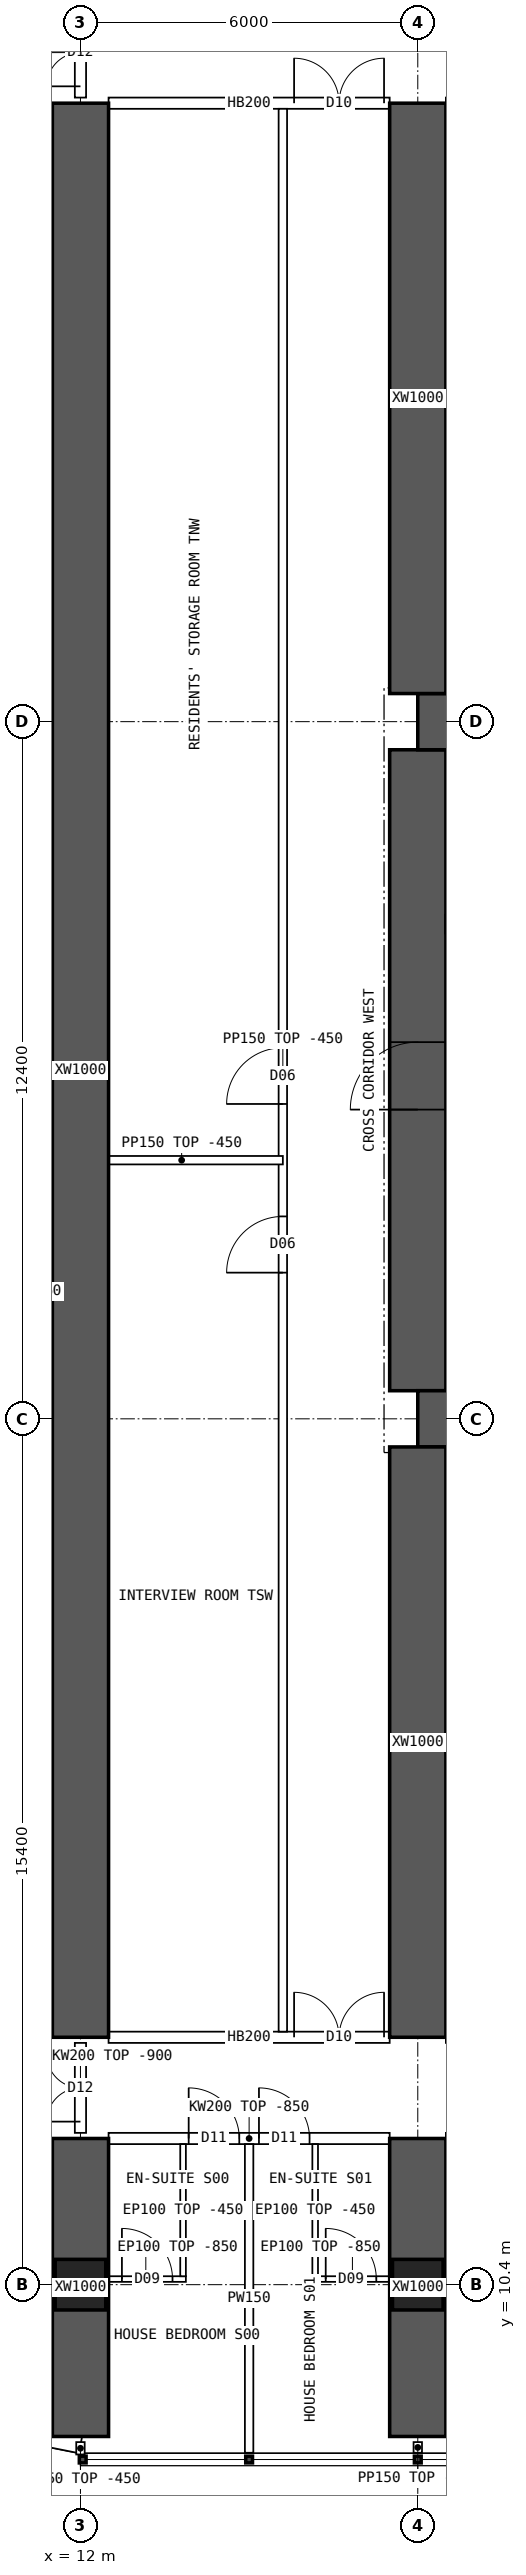
"""IFC4 building model, lengths in metres.
Left out: names, types, materials, properties, quantities, classifications, styles, units other than length and angle.
Written with IfcOpenShell. Run it as: python <this file> out.ifc"""

import sys

from ifc_helpers import new_model, si_unit, direction, frame, frame_2d, origin, origin_2d, place, context, subcontext, project, spatial, polyline, rectangle, hollow_rectangle, outline, extrude, element, fill, save


model = new_model("IFC4")
c1 = context("Model", 3, precision=1e-05, world=origin(), true_north=direction((0.0, 1.0)))
c2 = subcontext(c1, "Body", "Model", "MODEL_VIEW")
j1 = project(units=[si_unit("LENGTHUNIT", "METRE"), si_unit("PLANEANGLEUNIT", "RADIAN")], contexts=[c1])
p1 = place(None, origin())
s1 = spatial("IfcSite", under=j1, at=p1, CompositionType="ELEMENT")
p2 = place(p1, origin())
s2 = spatial("IfcBuilding", under=s1, at=p2, CompositionType="ELEMENT")
p3 = place(p2, frame((0.0, 0.0, 20.2)))
s3 = spatial("IfcBuildingStorey", under=s2, at=p3, CompositionType="ELEMENT", Elevation=20.2)
for number, where, z_axis, x_axis in (
    (1, (12.0, 10.4, 0.0), (0.0, 0.0, 1.0), (1.0, 0.0, 0.0)),
    (2, (18.0, 10.4, 0.0), (0.0, 0.0, 1.0), (1.0, 0.0, 0.0)),
):
    element("IfcColumn", number, at=place(p3, frame(where, z_axis=z_axis, x_axis=x_axis)), inside=s3, PredefinedType="COLUMN", context=c2, shape_type="SweptSolid", body=[
        extrude(hollow_rectangle(XDim=0.9, YDim=0.9, WallThickness=0.09, at=origin_2d()), origin(), (0.0, 0.0, 1.0), 3.75),
    ])
for number, where, z_axis, x_axis in (
    (3, (18.0, 25.8, 0.0), (0.0, 0.0, 1.0), (1.0, 0.0, 0.0)),
    (4, (18.0, 38.2, 0.0), (0.0, 0.0, 1.0), (1.0, 0.0, 0.0)),
):
    element("IfcWall", number, at=place(p3, frame(where, z_axis=z_axis, x_axis=x_axis)), inside=s3, PredefinedType="SHEAR", context=c2, shape_type="SweptSolid", body=[
        extrude(rectangle(XDim=48.0, YDim=1.0, at=frame_2d((24.0, 0.0))), origin(), (0.0, 0.0, 1.0), 3.75),
    ])
p4 = place(p3, frame((18.0, 26.3, 0.0), z_axis=(0.0, 0.0, 1.0), x_axis=(0.0, 1.0, 0.0)))
e5 = element("IfcWall", 5, at=p4, inside=s3, PredefinedType="SHEAR", context=c2, shape_type="SweptSolid", body=[
    extrude(rectangle(XDim=11.4, YDim=1.0, at=frame_2d((5.7, 0.0))), origin(), (0.0, 0.0, 1.0), 3.75),
])
p5 = place(p4, frame((5.0, 0.0, 0.0)))
e6 = element("IfcOpeningElement", 6, at=p5, cuts=e5, PredefinedType="OPENING", context=c2, shape_type="SweptSolid", body=[
    extrude(rectangle(XDim=1.2, YDim=2.1, at=frame_2d((0.6, 1.05))), frame((0.0, 0.51, 0.0), z_axis=(0.0, -1.0, 0.0), x_axis=(1.0, 0.0, 0.0)), (0.0, 0.0, 1.0), 1.02),
])
p6 = place(p3, frame((12.0, 7.7, 0.0), z_axis=(0.0, 0.0, 1.0), x_axis=(0.0, 1.0, 0.0)))
e7 = element("IfcWall", 7, at=p6, inside=s3, PredefinedType="SHEAR", context=c2, shape_type="SweptSolid", body=[
    extrude(rectangle(XDim=5.3, YDim=1.0, at=frame_2d((2.65, 0.0))), origin(), (0.0, 0.0, 1.0), 3.75),
])
p7 = place(p3, frame((12.0, 14.8, 0.0), z_axis=(0.0, 0.0, 1.0), x_axis=(0.0, 1.0, 0.0)))
e8 = element("IfcWall", 8, at=p7, inside=s3, PredefinedType="SHEAR", context=c2, shape_type="SweptSolid", body=[
    extrude(rectangle(XDim=34.4, YDim=1.0, at=frame_2d((17.2, 0.0))), origin(), (0.0, 0.0, 1.0), 3.75),
])
p8 = place(p3, frame((18.0, 7.7, 0.0), z_axis=(0.0, 0.0, 1.0), x_axis=(0.0, 1.0, 0.0)))
e9 = element("IfcWall", 9, at=p8, inside=s3, PredefinedType="SHEAR", context=c2, shape_type="SweptSolid", body=[
    extrude(rectangle(XDim=5.3, YDim=1.0, at=frame_2d((2.65, 0.0))), origin(), (0.0, 0.0, 1.0), 3.75),
])
for number, where, z_axis, x_axis in (
    (10, (18.0, 14.8, 0.0), (0.0, 0.0, 1.0), (0.0, 1.0, 0.0)),
    (11, (18.0, 38.7, 0.0), (0.0, 0.0, 1.0), (0.0, 1.0, 0.0)),
):
    element("IfcWall", number, at=place(p3, frame(where, z_axis=z_axis, x_axis=x_axis)), inside=s3, PredefinedType="SHEAR", context=c2, shape_type="SweptSolid", body=[
        extrude(rectangle(XDim=10.5, YDim=1.0, at=frame_2d((5.25, 0.0))), origin(), (0.0, 0.0, 1.0), 3.75),
    ])
p9 = place(p3, frame((8.843, 8.178, 0.0), z_axis=(0.0, 0.0, 1.0), x_axis=(0.980787251524, -0.195080412259, 0.0)))
e12 = element("IfcWall", 12, at=p9, inside=s3, PredefinedType="SOLIDWALL", context=c2, shape_type="SweptSolid", body=[
    extrude(outline(polyline([(-0.03, -0.15), (3.249, -0.15), (3.189, 0.15), (0.03, 0.15), (-0.03, -0.15)])), origin(), (0.0, 0.0, 1.0), 3.3),
])
p10 = place(p9, frame((0.909, 0.0, 0.9)))
e13 = element("IfcOpeningElement", 13, at=p10, cuts=e12, PredefinedType="OPENING", context=c2, shape_type="SweptSolid", body=[
    extrude(rectangle(XDim=1.4, YDim=1.8, at=frame_2d((0.7, 0.9))), frame((0.0, 0.16, 0.0), z_axis=(0.0, -1.0, 0.0), x_axis=(1.0, 0.0, 0.0)), (0.0, 0.0, 1.0), 0.32),
])
p11 = place(p3, frame((12.5, 13.0, 0.0), z_axis=(0.0, 0.0, 1.0), x_axis=(1.0, 0.0, 0.0)))
e14 = element("IfcWall", 14, at=p11, inside=s3, PredefinedType="SOLIDWALL", context=c2, shape_type="SweptSolid", body=[
    extrude(outline(polyline([(0.0, 0.0), (5.0, 0.0), (5.0, 2.9), (0.0, 2.9), (0.0, 0.0)])), frame((0.0, 0.1, 0.0), z_axis=(0.0, -1.0, 0.0), x_axis=(1.0, 0.0, 0.0)), (0.0, 0.0, 1.0), 0.2),
])
p12 = place(p11, frame((1.425, 0.0, 0.0)))
e15 = element("IfcOpeningElement", 15, at=p12, cuts=e14, PredefinedType="OPENING", context=c2, shape_type="SweptSolid", body=[
    extrude(rectangle(XDim=0.9, YDim=2.1, at=frame_2d((0.45, 1.05))), frame((0.0, 0.11, 0.0), z_axis=(0.0, -1.0, 0.0), x_axis=(1.0, 0.0, 0.0)), (0.0, 0.0, 1.0), 0.22),
])
p13 = place(p11, frame((2.675, 0.0, 0.0)))
e16 = element("IfcOpeningElement", 16, at=p13, cuts=e14, PredefinedType="OPENING", context=c2, shape_type="SweptSolid", body=[
    extrude(rectangle(XDim=0.9, YDim=2.1, at=frame_2d((0.45, 1.05))), frame((0.0, 0.11, 0.0), z_axis=(0.0, -1.0, 0.0), x_axis=(1.0, 0.0, 0.0)), (0.0, 0.0, 1.0), 0.22),
])
p14 = place(p3, frame((12.5, 14.8, 0.0), z_axis=(0.0, 0.0, 1.0), x_axis=(1.0, 0.0, 0.0)))
e17 = element("IfcWall", 17, at=p14, inside=s3, PredefinedType="SOLIDWALL", context=c2, shape_type="SweptSolid", body=[
    extrude(rectangle(XDim=5.0, YDim=0.2, at=frame_2d((2.5, 0.0))), origin(), (0.0, 0.0, 1.0), 3.3),
])
p15 = place(p14, frame((3.3, 0.0, 0.0)))
e18 = element("IfcOpeningElement", 18, at=p15, cuts=e17, PredefinedType="OPENING", context=c2, shape_type="SweptSolid", body=[
    extrude(rectangle(XDim=1.6, YDim=2.1, at=frame_2d((0.8, 1.05))), frame((0.0, 0.11, 0.0), z_axis=(0.0, -1.0, 0.0), x_axis=(1.0, 0.0, 0.0)), (0.0, 0.0, 1.0), 0.22),
])
p16 = place(p3, frame((12.5, 49.2, 0.0), z_axis=(0.0, 0.0, 1.0), x_axis=(1.0, 0.0, 0.0)))
e19 = element("IfcWall", 19, at=p16, inside=s3, PredefinedType="SOLIDWALL", context=c2, shape_type="SweptSolid", body=[
    extrude(rectangle(XDim=5.0, YDim=0.2, at=frame_2d((2.5, 0.0))), origin(), (0.0, 0.0, 1.0), 3.3),
])
p17 = place(p16, frame((3.3, 0.0, 0.0)))
e20 = element("IfcOpeningElement", 20, at=p17, cuts=e19, PredefinedType="OPENING", context=c2, shape_type="SweptSolid", body=[
    extrude(rectangle(XDim=1.6, YDim=2.1, at=frame_2d((0.8, 1.05))), frame((0.0, 0.11, 0.0), z_axis=(0.0, -1.0, 0.0), x_axis=(1.0, 0.0, 0.0)), (0.0, 0.0, 1.0), 0.22),
])
p18 = place(p3, frame((15.0, 7.41, 0.0), z_axis=(0.0, 0.0, 1.0), x_axis=(0.0, 1.0, 0.0)))
e21 = element("IfcWall", 21, at=p18, inside=s3, PredefinedType="PARTITIONING", context=c2, shape_type="SweptSolid", body=[
    extrude(outline(polyline([(0.0, 0.0), (5.49, 0.0), (5.49, 2.9), (5.442, 2.9), (5.44, 3.3), (3.192, 3.3), (3.19, 2.9), (2.792, 2.9), (2.79, 3.3), (0.0, 3.3), (0.0, 0.0)])), frame((0.0, 0.075, 0.0), z_axis=(0.0, -1.0, 0.0), x_axis=(1.0, 0.0, 0.0)), (0.0, 0.0, 1.0), 0.15),
])
p19 = place(p3, frame((13.875, 10.5, 0.0), z_axis=(0.0, 0.0, 1.0), x_axis=(-1.0, 0.0, 0.0)))
e22 = element("IfcWall", 22, at=p19, inside=s3, PredefinedType="PARTITIONING", context=c2, shape_type="SweptSolid", body=[
    extrude(outline(polyline([(0.0, 0.0), (1.425, 0.0), (1.425, 2.9), (0.0, 2.9), (0.0, 0.0)])), frame((0.0, 0.05, 0.0), z_axis=(0.0, -1.0, 0.0), x_axis=(1.0, 0.0, 0.0)), (0.0, 0.0, 1.0), 0.1),
])
p20 = place(p19, frame((0.238, 0.0, 0.0)))
e23 = element("IfcOpeningElement", 23, at=p20, cuts=e22, PredefinedType="OPENING", context=c2, shape_type="SweptSolid", body=[
    extrude(rectangle(XDim=0.9, YDim=2.1, at=frame_2d((0.45, 1.05))), frame((0.0, 0.06, 0.0), z_axis=(0.0, -1.0, 0.0), x_axis=(1.0, 0.0, 0.0)), (0.0, 0.0, 1.0), 0.12),
])
p21 = place(p3, frame((13.825, 10.55, 0.0), z_axis=(0.0, 0.0, 1.0), x_axis=(0.0, 1.0, 0.0)))
e24 = element("IfcWall", 24, at=p21, inside=s3, PredefinedType="PARTITIONING", context=c2, shape_type="SweptSolid", body=[
    extrude(outline(polyline([(0.0, 0.0), (2.35, 0.0), (2.35, 2.9), (2.302, 2.9), (2.3, 3.3), (0.052, 3.3), (0.05, 2.9), (0.0, 2.9), (0.0, 0.0)])), frame((0.0, 0.05, 0.0), z_axis=(0.0, -1.0, 0.0), x_axis=(1.0, 0.0, 0.0)), (0.0, 0.0, 1.0), 0.1),
])
p22 = place(p3, frame((17.55, 10.5, 0.0), z_axis=(0.0, 0.0, 1.0), x_axis=(-1.0, 0.0, 0.0)))
e25 = element("IfcWall", 25, at=p22, inside=s3, PredefinedType="PARTITIONING", context=c2, shape_type="SweptSolid", body=[
    extrude(outline(polyline([(0.0, 0.0), (1.425, 0.0), (1.425, 2.9), (0.0, 2.9), (0.0, 0.0)])), frame((0.0, 0.05, 0.0), z_axis=(0.0, -1.0, 0.0), x_axis=(1.0, 0.0, 0.0)), (0.0, 0.0, 1.0), 0.1),
])
p23 = place(p22, frame((0.288, 0.0, 0.0)))
e26 = element("IfcOpeningElement", 26, at=p23, cuts=e25, PredefinedType="OPENING", context=c2, shape_type="SweptSolid", body=[
    extrude(rectangle(XDim=0.9, YDim=2.1, at=frame_2d((0.45, 1.05))), frame((0.0, 0.06, 0.0), z_axis=(0.0, -1.0, 0.0), x_axis=(1.0, 0.0, 0.0)), (0.0, 0.0, 1.0), 0.12),
])
p24 = place(p3, frame((16.175, 10.55, 0.0), z_axis=(0.0, 0.0, 1.0), x_axis=(0.0, 1.0, 0.0)))
e27 = element("IfcWall", 27, at=p24, inside=s3, PredefinedType="PARTITIONING", context=c2, shape_type="SweptSolid", body=[
    extrude(outline(polyline([(0.0, 0.0), (2.35, 0.0), (2.35, 2.9), (2.302, 2.9), (2.3, 3.3), (0.052, 3.3), (0.05, 2.9), (0.0, 2.9), (0.0, 0.0)])), frame((0.0, 0.05, 0.0), z_axis=(0.0, -1.0, 0.0), x_axis=(1.0, 0.0, 0.0)), (0.0, 0.0, 1.0), 0.1),
])
p25 = place(p3, frame((19.875, 10.5, 0.0), z_axis=(0.0, 0.0, 1.0), x_axis=(-1.0, 0.0, 0.0)))
e28 = element("IfcWall", 28, at=p25, inside=s3, PredefinedType="PARTITIONING", context=c2, shape_type="SweptSolid", body=[
    extrude(outline(polyline([(0.0, 0.0), (1.425, 0.0), (1.425, 2.9), (0.0, 2.9), (0.0, 0.0)])), frame((0.0, 0.05, 0.0), z_axis=(0.0, -1.0, 0.0), x_axis=(1.0, 0.0, 0.0)), (0.0, 0.0, 1.0), 0.1),
])
p26 = place(p25, frame((0.238, 0.0, 0.0)))
e29 = element("IfcOpeningElement", 29, at=p26, cuts=e28, PredefinedType="OPENING", context=c2, shape_type="SweptSolid", body=[
    extrude(rectangle(XDim=0.9, YDim=2.1, at=frame_2d((0.45, 1.05))), frame((0.0, 0.06, 0.0), z_axis=(0.0, -1.0, 0.0), x_axis=(1.0, 0.0, 0.0)), (0.0, 0.0, 1.0), 0.12),
])
p27 = place(p3, frame((15.6, 14.9, 0.0), z_axis=(0.0, 0.0, 1.0), x_axis=(0.0, 1.0, 0.0)))
e30 = element("IfcWall", 30, at=p27, inside=s3, PredefinedType="PARTITIONING", context=c2, shape_type="SweptSolid", body=[
    extrude(rectangle(XDim=34.2, YDim=0.15, at=frame_2d((17.1, 0.0))), origin(), (0.0, 0.0, 1.0), 3.3),
])
p28 = place(p27, frame((13.5, 0.0, 0.0)))
e31 = element("IfcOpeningElement", 31, at=p28, cuts=e30, PredefinedType="OPENING", context=c2, shape_type="SweptSolid", body=[
    extrude(rectangle(XDim=1.0, YDim=2.1, at=frame_2d((0.5, 1.05))), frame((0.0, 0.085, 0.0), z_axis=(0.0, -1.0, 0.0), x_axis=(1.0, 0.0, 0.0)), (0.0, 0.0, 1.0), 0.17),
])
p29 = place(p27, frame((16.5, 0.0, 0.0)))
e32 = element("IfcOpeningElement", 32, at=p29, cuts=e30, PredefinedType="OPENING", context=c2, shape_type="SweptSolid", body=[
    extrude(rectangle(XDim=1.0, YDim=2.1, at=frame_2d((0.5, 1.05))), frame((0.0, 0.085, 0.0), z_axis=(0.0, -1.0, 0.0), x_axis=(1.0, 0.0, 0.0)), (0.0, 0.0, 1.0), 0.17),
])
p30 = place(p3, frame((12.0, 30.4, 0.0), z_axis=(0.0, 0.0, 1.0), x_axis=(1.0, 0.0, 0.0)))
e33 = element("IfcWall", 33, at=p30, inside=s3, PredefinedType="PARTITIONING", context=c2, shape_type="SweptSolid", body=[
    extrude(rectangle(XDim=3.6, YDim=0.15, at=frame_2d((1.8, 0.0))), origin(), (0.0, 0.0, 1.0), 3.3),
])
p31 = place(p3, frame((3.905, 30.85, 0.0), z_axis=(0.0, 0.0, 1.0), x_axis=(1.0, 0.0, 0.0)))
e34 = element("IfcWall", 34, at=p31, inside=s3, PredefinedType="PARTITIONING", context=c2, shape_type="SweptSolid", body=[
    extrude(outline(polyline([(0.0, 0.0), (8.02, 0.0), (8.02, 3.3), (2.397, 3.3), (2.395, 2.85), (1.797, 2.85), (1.795, 3.3), (0.0, 3.3), (0.0, 0.0)])), frame((0.0, 0.075, 0.0), z_axis=(0.0, -1.0, 0.0), x_axis=(1.0, 0.0, 0.0)), (0.0, 0.0, 1.0), 0.15),
])
p32 = place(p3, frame((12.0, 13.1, 0.0), z_axis=(0.0, 0.0, 1.0), x_axis=(0.0, 1.0, 0.0)))
e35 = element("IfcWall", 35, at=p32, inside=s3, PredefinedType="SOLIDWALL", context=c2, shape_type="SweptSolid", body=[
    extrude(outline(polyline([(0.0, 0.0), (1.6, 0.0), (1.6, 2.85), (0.0, 2.85), (0.0, 0.0)])), frame((0.0, 0.1, 0.0), z_axis=(0.0, -1.0, 0.0), x_axis=(1.0, 0.0, 0.0)), (0.0, 0.0, 1.0), 0.2),
])
p33 = place(p32, frame((0.2, 0.0, 0.0)))
e36 = element("IfcOpeningElement", 36, at=p33, cuts=e35, PredefinedType="OPENING", context=c2, shape_type="SweptSolid", body=[
    extrude(rectangle(XDim=1.2, YDim=2.1, at=frame_2d((0.6, 1.05))), frame((0.0, 0.11, 0.0), z_axis=(0.0, -1.0, 0.0), x_axis=(1.0, 0.0, 0.0)), (0.0, 0.0, 1.0), 0.22),
])
p34 = place(p3, frame((12.0, 49.3, 0.0), z_axis=(0.0, 0.0, 1.0), x_axis=(0.0, 1.0, 0.0)))
e37 = element("IfcWall", 37, at=p34, inside=s3, PredefinedType="SOLIDWALL", context=c2, shape_type="SweptSolid", body=[
    extrude(outline(polyline([(0.0, 0.0), (1.6, 0.0), (1.6, 2.85), (0.0, 2.85), (0.0, 0.0)])), frame((0.0, 0.1, 0.0), z_axis=(0.0, -1.0, 0.0), x_axis=(1.0, 0.0, 0.0)), (0.0, 0.0, 1.0), 0.2),
])
p35 = place(p34, frame((0.2, 0.0, 0.0)))
e38 = element("IfcOpeningElement", 38, at=p35, cuts=e37, PredefinedType="OPENING", context=c2, shape_type="SweptSolid", body=[
    extrude(rectangle(XDim=1.2, YDim=2.1, at=frame_2d((0.6, 1.05))), frame((0.0, 0.11, 0.0), z_axis=(0.0, -1.0, 0.0), x_axis=(1.0, 0.0, 0.0)), (0.0, 0.0, 1.0), 0.22),
])
p36 = place(p3, frame((12.0, 7.6, 0.0), z_axis=(0.0, 0.0, 1.0), x_axis=(0.0, -1.0, 0.0)))
e39 = element("IfcWall", 39, at=p36, inside=s3, PredefinedType="PARTITIONING", context=c2, shape_type="SweptSolid", body=[
    extrude(rectangle(XDim=0.22, YDim=0.15, at=frame_2d((0.11, 0.0))), origin(), (0.0, 0.0, 1.0), 3.3),
])
p37 = place(p3, frame((18.0, 7.6, 0.0), z_axis=(0.0, 0.0, 1.0), x_axis=(0.0, -1.0, 0.0)))
e40 = element("IfcWall", 40, at=p37, inside=s3, PredefinedType="PARTITIONING", context=c2, shape_type="SweptSolid", body=[
    extrude(rectangle(XDim=0.19, YDim=0.15, at=frame_2d((0.095, 0.0))), origin(), (0.0, 0.0, 1.0), 3.3),
])
p38 = place(p5, origin())
e41 = element("IfcDoor", 41, at=p38, inside=s3, OperationType="SINGLE_SWING_LEFT", PredefinedType="DOOR", context=c2, shape_type="SweptSolid", body=[
    extrude(rectangle(XDim=1.2, YDim=2.1, at=frame_2d((0.6, 1.05))), frame((0.0, 0.025, 0.0), z_axis=(0.0, -1.0, 0.0), x_axis=(1.0, 0.0, 0.0)), (0.0, 0.0, 1.0), 0.05),
])
fill(e6, e41)
p39 = place(p15, origin())
e42 = element("IfcDoor", 42, at=p39, inside=s3, OperationType="DOUBLE_DOOR_SINGLE_SWING", PredefinedType="DOOR", context=c2, shape_type="SweptSolid", body=[
    extrude(rectangle(XDim=1.6, YDim=2.1, at=frame_2d((0.8, 1.05))), frame((0.0, 0.025, 0.0), z_axis=(0.0, -1.0, 0.0), x_axis=(1.0, 0.0, 0.0)), (0.0, 0.0, 1.0), 0.05),
])
fill(e18, e42)
p40 = place(p17, origin())
e43 = element("IfcDoor", 43, at=p40, inside=s3, OperationType="DOUBLE_DOOR_SINGLE_SWING", PredefinedType="DOOR", context=c2, shape_type="SweptSolid", body=[
    extrude(rectangle(XDim=1.6, YDim=2.1, at=frame_2d((0.8, 1.05))), frame((0.0, 0.025, 0.0), z_axis=(0.0, -1.0, 0.0), x_axis=(1.0, 0.0, 0.0)), (0.0, 0.0, 1.0), 0.05),
])
fill(e20, e43)
p41 = place(p20, origin())
e44 = element("IfcDoor", 44, at=p41, inside=s3, OperationType="SINGLE_SWING_RIGHT", PredefinedType="DOOR", context=c2, shape_type="SweptSolid", body=[
    extrude(rectangle(XDim=0.9, YDim=2.1, at=frame_2d((0.45, 1.05))), frame((0.0, 0.025, 0.0), z_axis=(0.0, -1.0, 0.0), x_axis=(1.0, 0.0, 0.0)), (0.0, 0.0, 1.0), 0.05),
])
fill(e23, e44)
p42 = place(p12, origin())
e45 = element("IfcDoor", 45, at=p42, inside=s3, OperationType="SINGLE_SWING_LEFT", PredefinedType="DOOR", context=c2, shape_type="SweptSolid", body=[
    extrude(rectangle(XDim=0.9, YDim=2.1, at=frame_2d((0.45, 1.05))), frame((0.0, 0.025, 0.0), z_axis=(0.0, -1.0, 0.0), x_axis=(1.0, 0.0, 0.0)), (0.0, 0.0, 1.0), 0.05),
])
fill(e15, e45)
p43 = place(p23, origin())
e46 = element("IfcDoor", 46, at=p43, inside=s3, OperationType="SINGLE_SWING_RIGHT", PredefinedType="DOOR", context=c2, shape_type="SweptSolid", body=[
    extrude(rectangle(XDim=0.9, YDim=2.1, at=frame_2d((0.45, 1.05))), frame((0.0, 0.025, 0.0), z_axis=(0.0, -1.0, 0.0), x_axis=(1.0, 0.0, 0.0)), (0.0, 0.0, 1.0), 0.05),
])
fill(e26, e46)
p44 = place(p13, origin())
e47 = element("IfcDoor", 47, at=p44, inside=s3, OperationType="SINGLE_SWING_LEFT", PredefinedType="DOOR", context=c2, shape_type="SweptSolid", body=[
    extrude(rectangle(XDim=0.9, YDim=2.1, at=frame_2d((0.45, 1.05))), frame((0.0, 0.025, 0.0), z_axis=(0.0, -1.0, 0.0), x_axis=(1.0, 0.0, 0.0)), (0.0, 0.0, 1.0), 0.05),
])
fill(e16, e47)
p45 = place(p28, origin())
e48 = element("IfcDoor", 48, at=p45, inside=s3, OperationType="SINGLE_SWING_LEFT", PredefinedType="DOOR", context=c2, shape_type="SweptSolid", body=[
    extrude(rectangle(XDim=1.0, YDim=2.1, at=frame_2d((0.5, 1.05))), frame((0.0, 0.025, 0.0), z_axis=(0.0, -1.0, 0.0), x_axis=(1.0, 0.0, 0.0)), (0.0, 0.0, 1.0), 0.05),
])
fill(e31, e48)
p46 = place(p29, origin())
e49 = element("IfcDoor", 49, at=p46, inside=s3, OperationType="SINGLE_SWING_LEFT", PredefinedType="DOOR", context=c2, shape_type="SweptSolid", body=[
    extrude(rectangle(XDim=1.0, YDim=2.1, at=frame_2d((0.5, 1.05))), frame((0.0, 0.025, 0.0), z_axis=(0.0, -1.0, 0.0), x_axis=(1.0, 0.0, 0.0)), (0.0, 0.0, 1.0), 0.05),
])
fill(e32, e49)
p47 = place(p33, origin())
e50 = element("IfcDoor", 50, at=p47, inside=s3, OperationType="DOUBLE_DOOR_SINGLE_SWING", PredefinedType="DOOR", context=c2, shape_type="SweptSolid", body=[
    extrude(rectangle(XDim=1.2, YDim=2.1, at=frame_2d((0.6, 1.05))), frame((0.0, 0.025, 0.0), z_axis=(0.0, -1.0, 0.0), x_axis=(1.0, 0.0, 0.0)), (0.0, 0.0, 1.0), 0.05),
])
fill(e36, e50)
p48 = place(p35, origin())
e51 = element("IfcDoor", 51, at=p48, inside=s3, OperationType="DOUBLE_DOOR_SINGLE_SWING", PredefinedType="DOOR", context=c2, shape_type="SweptSolid", body=[
    extrude(rectangle(XDim=1.2, YDim=2.1, at=frame_2d((0.6, 1.05))), frame((0.0, 0.025, 0.0), z_axis=(0.0, -1.0, 0.0), x_axis=(1.0, 0.0, 0.0)), (0.0, 0.0, 1.0), 0.05),
])
fill(e38, e51)
save(model, sys.argv[1])
